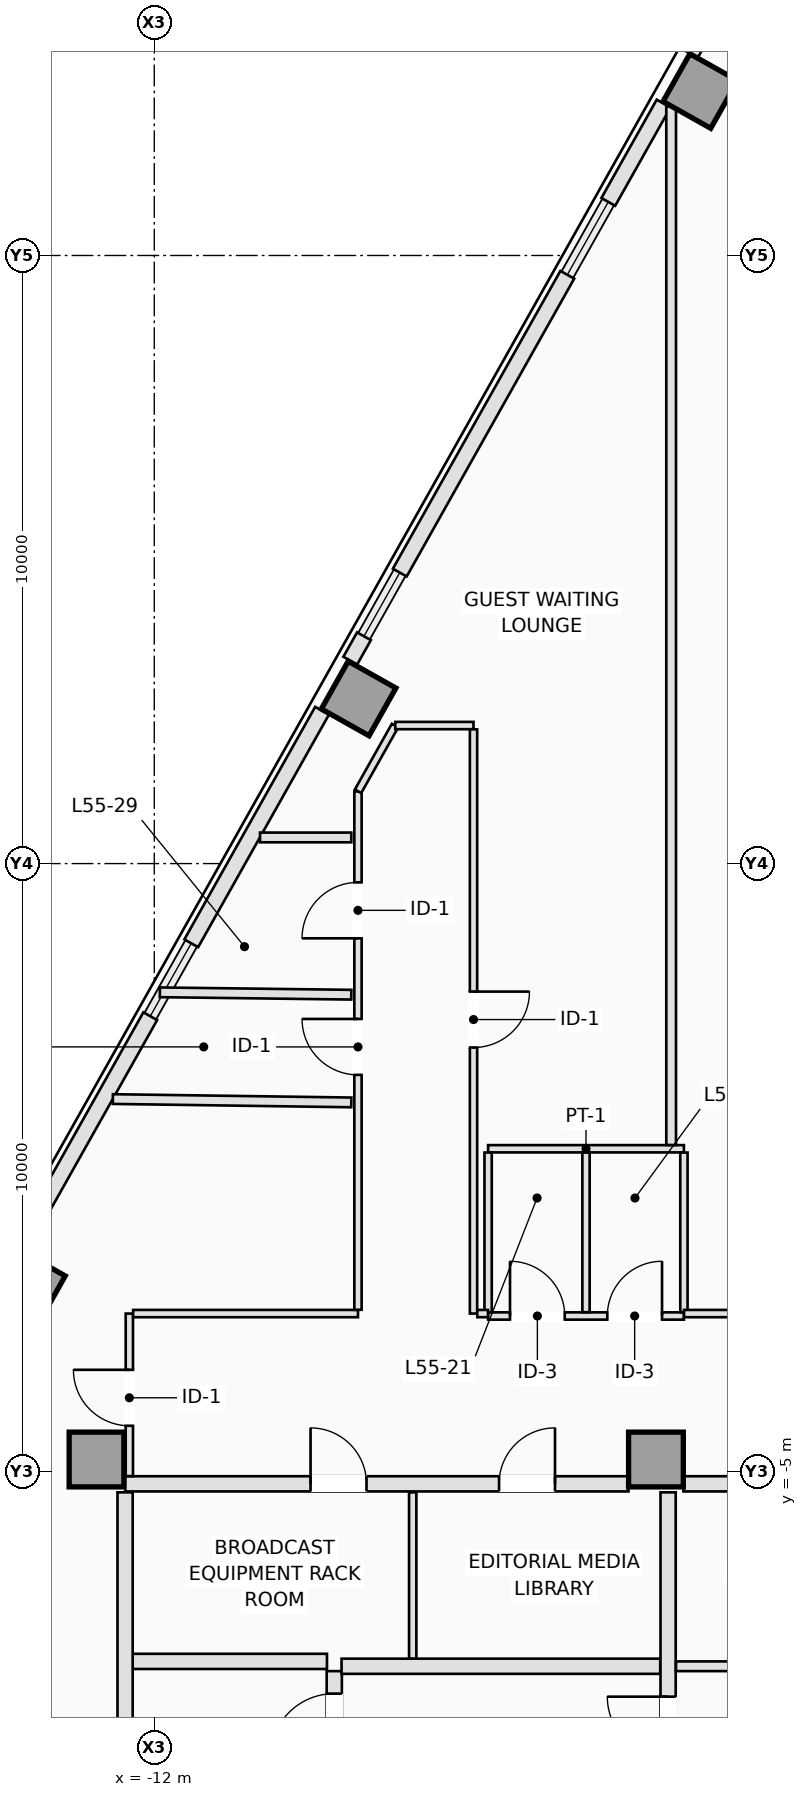
"""IFC4 building model, lengths in metres.
Left out: names, types, materials, properties, quantities, classifications, styles, units other than length and angle.
Written with IfcOpenShell. Run it as: python <this file> out.ifc"""

import sys

from ifc_helpers import new_model, si_unit, direction, frame, frame_2d, origin, origin_2d, place, context, subcontext, project, spatial, rectangle, extrude, element, fill, save


model = new_model("IFC4")
c1 = context("Model", 3, precision=1e-05, world=origin(), true_north=direction((0.0, 1.0)))
c2 = subcontext(c1, "Body", "Model", "MODEL_VIEW")
j1 = project(units=[si_unit("LENGTHUNIT", "METRE"), si_unit("PLANEANGLEUNIT", "RADIAN")], contexts=[c1])
p1 = place(None, origin())
s1 = spatial("IfcSite", under=j1, at=p1, CompositionType="ELEMENT")
p2 = place(p1, origin())
s2 = spatial("IfcBuilding", under=s1, at=p2, CompositionType="ELEMENT")
p3 = place(p2, frame((0.0, 0.0, 200.9)))
s3 = spatial("IfcBuildingStorey", under=s2, at=p3, CompositionType="ELEMENT", Elevation=200.9)
for number, where, z_axis, x_axis in (
    (1, (-12.95, -4.8, 0.0), (0.0, 0.0, 1.0), (1.0, 0.0, 0.0)),
    (2, (-3.75, -4.8, 0.0), (0.0, 0.0, 1.0), (1.0, 0.0, 0.0)),
    (3, (-3.021, 17.704, 0.0), (0.0, 0.0, 1.0), (-0.872, 0.49, 0.0)),
    (4, (-8.64, 7.715, 0.0), (0.0, 0.0, 1.0), (-0.872, 0.49, 0.0)),
    (5, (-14.077, -1.952, 0.0), (0.0, 0.0, 1.0), (-0.872, 0.49, 0.0)),
):
    element("IfcColumn", number, at=place(p3, frame(where, z_axis=z_axis, x_axis=x_axis)), inside=s3, PredefinedType="COLUMN", context=c2, shape_type="SweptSolid", body=[
        extrude(rectangle(XDim=0.9, YDim=0.9, at=origin_2d()), origin(), (0.0, 0.0, 1.0), 3.5),
    ])
p4 = place(p3, frame((-3.168, 18.309, 0.0), z_axis=(0.0, 0.0, 1.0), x_axis=(0.490345412687, 0.87152818443, 0.0)))
e6 = element("IfcWall", 6, at=p4, inside=s3, PredefinedType="STANDARD", context=c2, shape_type="SweptSolid", body=[
    extrude(rectangle(XDim=0.964, YDim=0.24, at=frame_2d((0.482, 0.0))), origin(), (0.0, 0.0, 1.0), 3.25),
])
p5 = place(p3, frame((-8.777, 8.337, 0.0), z_axis=(0.0, 0.0, 1.0), x_axis=(0.490412424957, 0.871490478116, 0.0)))
e7 = element("IfcWall", 7, at=p5, inside=s3, PredefinedType="STANDARD", context=c2, shape_type="SweptSolid", body=[
    extrude(rectangle(XDim=0.46, YDim=0.26, at=frame_2d((0.23, 0.0))), origin(), (0.0, 0.0, 1.0), 3.25),
])
p6 = place(p3, frame((-7.962, 9.785, 0.0), z_axis=(0.0, 0.0, 1.0), x_axis=(0.490240608828, 0.871587141631, 0.0)))
e8 = element("IfcWall", 8, at=p6, inside=s3, PredefinedType="STANDARD", context=c2, shape_type="SweptSolid", body=[
    extrude(rectangle(XDim=5.618, YDim=0.26, at=frame_2d((2.809, 0.0))), origin(), (0.0, 0.0, 1.0), 3.25),
])
p7 = place(p3, frame((-4.533, 15.882, 0.0), z_axis=(0.0, 0.0, 1.0), x_axis=(0.490261239633, 0.871575537125, 0.0)))
e9 = element("IfcWall", 9, at=p7, inside=s3, PredefinedType="STANDARD", context=c2, shape_type="SweptSolid", body=[
    extrude(rectangle(XDim=1.855, YDim=0.26, at=frame_2d((0.928, 0.0))), origin(), (0.0, 0.0, 1.0), 3.25),
])
p8 = place(p3, frame((-14.217, -1.334, 0.0), z_axis=(0.0, 0.0, 1.0), x_axis=(0.490261239633, 0.871575537125, 0.0)))
e10 = element("IfcWall", 10, at=p8, inside=s3, PredefinedType="STANDARD", context=c2, shape_type="SweptSolid", body=[
    extrude(rectangle(XDim=4.388, YDim=0.26, at=frame_2d((2.194, 0.0))), origin(), (0.0, 0.0, 1.0), 3.25),
])
p9 = place(p3, frame((-11.392, 3.689, 0.0), z_axis=(0.0, 0.0, 1.0), x_axis=(0.490237464814, 0.871588910033, 0.0)))
e11 = element("IfcWall", 11, at=p9, inside=s3, PredefinedType="STANDARD", context=c2, shape_type="SweptSolid", body=[
    extrude(rectangle(XDim=4.388, YDim=0.26, at=frame_2d((2.194, 0.0))), origin(), (0.0, 0.0, 1.0), 3.25),
])
p10 = place(p3, frame((-9.04, -10.18, 0.0), z_axis=(0.0, 0.0, 1.0), x_axis=(0.0, 1.0, 0.0)))
e12 = element("IfcWall", 12, at=p10, inside=s3, PredefinedType="PARTITIONING", context=c2, shape_type="SweptSolid", body=[
    extrude(rectangle(XDim=1.9, YDim=0.25, at=frame_2d((0.95, 0.0))), origin(), (0.0, 0.0, 1.0), 3.25),
])
p11 = place(p10, frame((0.48, 0.0, 0.0)))
e13 = element("IfcOpeningElement", 13, at=p11, cuts=e12, PredefinedType="OPENING", context=c2, shape_type="SweptSolid", body=[
    extrude(rectangle(XDim=1.05, YDim=2.15, at=frame_2d((0.525, 1.075))), frame((0.0, 0.135, 0.0), z_axis=(0.0, -1.0, 0.0), x_axis=(1.0, 0.0, 0.0)), (0.0, 0.0, 1.0), 0.27),
])
p12 = place(p3, frame((-12.38, -8.12, 0.0), z_axis=(0.0, 0.0, 1.0), x_axis=(1.0, 0.0, 0.0)))
e14 = element("IfcWall", 14, at=p12, inside=s3, PredefinedType="PARTITIONING", context=c2, shape_type="SweptSolid", body=[
    extrude(rectangle(XDim=3.22, YDim=0.25, at=frame_2d((1.61, 0.0))), origin(), (0.0, 0.0, 1.0), 3.25),
])
p13 = place(p3, frame((-12.48, -10.18, 0.0), z_axis=(0.0, 0.0, 1.0), x_axis=(0.0, 1.0, 0.0)))
e15 = element("IfcWall", 15, at=p13, inside=s3, PredefinedType="PARTITIONING", context=c2, shape_type="SweptSolid", body=[
    extrude(rectangle(XDim=4.84, YDim=0.25, at=frame_2d((2.42, 0.0))), origin(), (0.0, 0.0, 1.0), 3.25),
])
p14 = place(p3, frame((-8.92, -8.2, 0.0), z_axis=(0.0, 0.0, 1.0), x_axis=(1.0, 0.0, 0.0)))
e16 = element("IfcWall", 16, at=p14, inside=s3, PredefinedType="PARTITIONING", context=c2, shape_type="SweptSolid", body=[
    extrude(rectangle(XDim=5.24, YDim=0.25, at=frame_2d((2.62, 0.0))), origin(), (0.0, 0.0, 1.0), 3.25),
])
p15 = place(p3, frame((-3.55, -15.898, 0.0), z_axis=(0.0, 0.0, 1.0), x_axis=(0.0, 1.0, 0.0)))
e17 = element("IfcWall", 17, at=p15, inside=s3, PredefinedType="PARTITIONING", context=c2, shape_type="SweptSolid", body=[
    extrude(rectangle(XDim=10.558, YDim=0.25, at=frame_2d((5.279, 0.0))), origin(), (0.0, 0.0, 1.0), 3.25),
])
p16 = place(p15, frame((6.198, 0.0, 0.0)))
e18 = element("IfcOpeningElement", 18, at=p16, cuts=e17, PredefinedType="OPENING", context=c2, shape_type="SweptSolid", body=[
    extrude(rectangle(XDim=1.0, YDim=2.15, at=frame_2d((0.5, 1.075))), frame((0.0, 0.135, 0.0), z_axis=(0.0, -1.0, 0.0), x_axis=(1.0, 0.0, 0.0)), (0.0, 0.0, 1.0), 0.27),
])
p17 = place(p3, frame((-12.48, -5.2, 0.0), z_axis=(0.0, 0.0, 1.0), x_axis=(1.0, 0.0, 0.0)))
e19 = element("IfcWall", 19, at=p17, inside=s3, PredefinedType="PARTITIONING", context=c2, shape_type="SweptSolid", body=[
    extrude(rectangle(XDim=8.278, YDim=0.25, at=frame_2d((4.139, 0.0))), origin(), (0.0, 0.0, 1.0), 3.25),
])
p18 = place(p17, frame((3.05, 0.0, 0.0)))
e20 = element("IfcOpeningElement", 20, at=p18, cuts=e19, PredefinedType="OPENING", context=c2, shape_type="SweptSolid", body=[
    extrude(rectangle(XDim=0.92, YDim=2.12, at=frame_2d((0.46, 1.06))), frame((0.0, 0.135, 0.0), z_axis=(0.0, -1.0, 0.0), x_axis=(1.0, 0.0, 0.0)), (0.0, 0.0, 1.0), 0.27),
])
p19 = place(p17, frame((6.15, 0.0, 0.0)))
e21 = element("IfcOpeningElement", 21, at=p19, cuts=e19, PredefinedType="OPENING", context=c2, shape_type="SweptSolid", body=[
    extrude(rectangle(XDim=0.92, YDim=2.12, at=frame_2d((0.46, 1.06))), frame((0.0, 0.135, 0.0), z_axis=(0.0, -1.0, 0.0), x_axis=(1.0, 0.0, 0.0)), (0.0, 0.0, 1.0), 0.27),
])
p20 = place(p3, frame((-3.298, -5.2, 0.0), z_axis=(0.0, 0.0, 1.0), x_axis=(1.0, 0.0, 0.0)))
e22 = element("IfcWall", 22, at=p20, inside=s3, PredefinedType="PARTITIONING", context=c2, shape_type="SweptSolid", body=[
    extrude(rectangle(XDim=2.348, YDim=0.25, at=frame_2d((1.174, 0.0))), origin(), (0.0, 0.0, 1.0), 3.25),
])
p21 = place(p3, frame((-7.75, -8.073, 0.0), z_axis=(0.0, 0.0, 1.0), x_axis=(0.0, 1.0, 0.0)))
e23 = element("IfcWall", 23, at=p21, inside=s3, PredefinedType="PARTITIONING", context=c2, shape_type="SweptSolid", body=[
    extrude(rectangle(XDim=2.733, YDim=0.12, at=frame_2d((1.366, 0.0))), origin(), (0.0, 0.0, 1.0), 3.25),
])
p22 = place(p3, frame((-3.42, -8.2, 0.0), z_axis=(0.0, 0.0, 1.0), x_axis=(1.0, 0.0, 0.0)))
e24 = element("IfcWall", 24, at=p22, inside=s3, PredefinedType="PARTITIONING", context=c2, shape_type="SweptSolid", body=[
    extrude(rectangle(XDim=6.84, YDim=0.16, at=frame_2d((3.42, 0.0))), origin(), (0.0, 0.0, 1.0), 3.25),
])
p23 = place(p22, frame((2.92, 0.0, 0.0)))
e25 = element("IfcOpeningElement", 25, at=p23, cuts=e24, PredefinedType="OPENING", context=c2, shape_type="SweptSolid", body=[
    extrude(rectangle(XDim=1.0, YDim=2.15, at=frame_2d((0.5, 1.075))), frame((0.0, 0.09, 0.0), z_axis=(0.0, -1.0, 0.0), x_axis=(1.0, 0.0, 0.0)), (0.0, 0.0, 1.0), 0.18),
])
p24 = place(p3, frame((-6.51, -2.44, 0.0), z_axis=(0.0, 0.0, 1.0), x_axis=(1.0, 0.0, 0.0)))
e26 = element("IfcWall", 26, at=p24, inside=s3, PredefinedType="PARTITIONING", context=c2, shape_type="SweptSolid", body=[
    extrude(rectangle(XDim=3.22, YDim=0.12, at=frame_2d((1.61, 0.0))), origin(), (0.0, 0.0, 1.0), 2.943),
])
p25 = place(p24, frame((0.36, 0.0, 0.0)))
e27 = element("IfcOpeningElement", 27, at=p25, cuts=e26, PredefinedType="OPENING", context=c2, shape_type="SweptSolid", body=[
    extrude(rectangle(XDim=0.9, YDim=2.12, at=frame_2d((0.45, 1.06))), frame((0.0, 0.07, 0.0), z_axis=(0.0, -1.0, 0.0), x_axis=(1.0, 0.0, 0.0)), (0.0, 0.0, 1.0), 0.14),
])
p26 = place(p24, frame((1.96, 0.0, 0.0)))
e28 = element("IfcOpeningElement", 28, at=p26, cuts=e26, PredefinedType="OPENING", context=c2, shape_type="SweptSolid", body=[
    extrude(rectangle(XDim=0.9, YDim=2.12, at=frame_2d((0.45, 1.06))), frame((0.0, 0.07, 0.0), z_axis=(0.0, -1.0, 0.0), x_axis=(1.0, 0.0, 0.0)), (0.0, 0.0, 1.0), 0.14),
])
p27 = place(p3, frame((-6.51, 0.31, 0.0), z_axis=(0.0, 0.0, 1.0), x_axis=(1.0, 0.0, 0.0)))
e29 = element("IfcWall", 29, at=p27, inside=s3, PredefinedType="PARTITIONING", context=c2, shape_type="SweptSolid", body=[
    extrude(rectangle(XDim=3.22, YDim=0.12, at=frame_2d((1.61, 0.0))), origin(), (0.0, 0.0, 1.0), 3.25),
])
for number, where, z_axis, x_axis in (
    (30, (-6.51, -2.378, 0.0), (0.0, 0.0, 1.0), (0.0, 1.0, 0.0)),
    (31, (-4.9, -2.378, 0.0), (0.0, 0.0, 1.0), (0.0, 1.0, 0.0)),
    (32, (-3.29, -2.378, 0.0), (0.0, 0.0, 1.0), (0.0, 1.0, 0.0)),
):
    element("IfcWall", number, at=place(p3, frame(where, z_axis=z_axis, x_axis=x_axis)), inside=s3, PredefinedType="PARTITIONING", context=c2, shape_type="SweptSolid", body=[
        extrude(rectangle(XDim=2.626, YDim=0.12, at=frame_2d((1.313, 0.0))), origin(), (0.0, 0.0, 1.0), 3.25),
    ])
p28 = place(p3, frame((-12.41, -5.073, 0.0), z_axis=(0.0, 0.0, 1.0), x_axis=(0.0, 1.0, 0.0)))
e33 = element("IfcWall", 33, at=p28, inside=s3, PredefinedType="PARTITIONING", context=c2, shape_type="SweptSolid", body=[
    extrude(rectangle(XDim=2.673, YDim=0.12, at=frame_2d((1.336, 0.0))), origin(), (0.0, 0.0, 1.0), 3.25),
])
p29 = place(p28, frame((0.828, 0.0, 0.0)))
e34 = element("IfcOpeningElement", 34, at=p29, cuts=e33, PredefinedType="OPENING", context=c2, shape_type="SweptSolid", body=[
    extrude(rectangle(XDim=0.92, YDim=2.12, at=frame_2d((0.46, 1.06))), frame((0.0, 0.07, 0.0), z_axis=(0.0, -1.0, 0.0), x_axis=(1.0, 0.0, 0.0)), (0.0, 0.0, 1.0), 0.14),
])
p30 = place(p3, frame((-12.348, -2.4, 0.0), z_axis=(0.0, 0.0, 1.0), x_axis=(1.0, 0.0, 0.0)))
e35 = element("IfcWall", 35, at=p30, inside=s3, PredefinedType="PARTITIONING", context=c2, shape_type="SweptSolid", body=[
    extrude(rectangle(XDim=3.698, YDim=0.12, at=frame_2d((1.849, 0.0))), origin(), (0.0, 0.0, 1.0), 3.25),
])
p31 = place(p3, frame((-8.65, -2.338, 0.0), z_axis=(0.0, 0.0, 1.0), x_axis=(0.0, 1.0, 0.0)))
e36 = element("IfcWall", 36, at=p31, inside=s3, PredefinedType="PARTITIONING", context=c2, shape_type="SweptSolid", body=[
    extrude(rectangle(XDim=8.525, YDim=0.12, at=frame_2d((4.262, 0.0))), origin(), (0.0, 0.0, 1.0), 3.25),
])
p32 = place(p31, frame((6.109, 0.0, 0.0)))
e37 = element("IfcOpeningElement", 37, at=p32, cuts=e36, PredefinedType="OPENING", context=c2, shape_type="SweptSolid", body=[
    extrude(rectangle(XDim=0.92, YDim=2.12, at=frame_2d((0.46, 1.06))), frame((0.0, 0.07, 0.0), z_axis=(0.0, -1.0, 0.0), x_axis=(1.0, 0.0, 0.0)), (0.0, 0.0, 1.0), 0.14),
])
p33 = place(p31, frame((3.863, 0.0, 0.0)))
e38 = element("IfcOpeningElement", 38, at=p33, cuts=e36, PredefinedType="OPENING", context=c2, shape_type="SweptSolid", body=[
    extrude(rectangle(XDim=0.92, YDim=2.12, at=frame_2d((0.46, 1.06))), frame((0.0, 0.07, 0.0), z_axis=(0.0, -1.0, 0.0), x_axis=(1.0, 0.0, 0.0)), (0.0, 0.0, 1.0), 0.14),
])
p34 = place(p3, frame((-8.649, 6.189, 0.0), z_axis=(0.0, 0.0, 1.0), x_axis=(0.490298618985, 0.871554510183, 0.0)))
e39 = element("IfcWall", 39, at=p34, inside=s3, PredefinedType="PARTITIONING", context=c2, shape_type="SweptSolid", body=[
    extrude(rectangle(XDim=1.24, YDim=0.12, at=frame_2d((0.62, 0.0))), origin(), (0.0, 0.0, 1.0), 3.25),
])
p35 = place(p3, frame((-8.037, 7.27, 0.0), z_axis=(0.0, 0.0, 1.0), x_axis=(1.0, 0.0, 0.0)))
e40 = element("IfcWall", 40, at=p35, inside=s3, PredefinedType="PARTITIONING", context=c2, shape_type="SweptSolid", body=[
    extrude(rectangle(XDim=1.287, YDim=0.12, at=frame_2d((0.643, 0.0))), origin(), (0.0, 0.0, 1.0), 3.25),
])
p36 = place(p3, frame((-6.75, 7.208, 0.0), z_axis=(0.0, 0.0, 1.0), x_axis=(0.0, -1.0, 0.0)))
e41 = element("IfcWall", 41, at=p36, inside=s3, PredefinedType="PARTITIONING", context=c2, shape_type="SweptSolid", body=[
    extrude(rectangle(XDim=9.608, YDim=0.12, at=frame_2d((4.804, 0.0))), origin(), (0.0, 0.0, 1.0), 3.25),
])
p37 = place(p36, frame((4.313, 0.0, 0.0)))
e42 = element("IfcOpeningElement", 42, at=p37, cuts=e41, PredefinedType="OPENING", context=c2, shape_type="SweptSolid", body=[
    extrude(rectangle(XDim=0.92, YDim=2.12, at=frame_2d((0.46, 1.06))), frame((0.0, 0.07, 0.0), z_axis=(0.0, -1.0, 0.0), x_axis=(1.0, 0.0, 0.0)), (0.0, 0.0, 1.0), 0.14),
])
p38 = place(p3, frame((-6.688, -2.4, 0.0), z_axis=(0.0, 0.0, 1.0), x_axis=(1.0, 0.0, 0.0)))
e43 = element("IfcWall", 43, at=p38, inside=s3, PredefinedType="PARTITIONING", context=c2, shape_type="SweptSolid", body=[
    extrude(rectangle(XDim=0.176, YDim=0.12, at=frame_2d((0.088, 0.0))), origin(), (0.0, 0.0, 1.0), 3.25),
])
p39 = place(p3, frame((-3.288, -2.4, 0.0), z_axis=(0.0, 0.0, 1.0), x_axis=(1.0, 0.0, 0.0)))
e44 = element("IfcWall", 44, at=p39, inside=s3, PredefinedType="PARTITIONING", context=c2, shape_type="SweptSolid", body=[
    extrude(rectangle(XDim=6.576, YDim=0.12, at=frame_2d((3.288, 0.0))), origin(), (0.0, 0.0, 1.0), 2.943),
])
p40 = place(p39, frame((2.773, 0.0, 0.0)))
e45 = element("IfcOpeningElement", 45, at=p40, cuts=e44, PredefinedType="OPENING", context=c2, shape_type="SweptSolid", body=[
    extrude(rectangle(XDim=0.92, YDim=2.12, at=frame_2d((0.46, 1.06))), frame((0.0, 0.07, 0.0), z_axis=(0.0, -1.0, 0.0), x_axis=(1.0, 0.0, 0.0)), (0.0, 0.0, 1.0), 0.14),
])
p41 = place(p3, frame((-3.5, 17.455, 0.0), z_axis=(0.0, 0.0, 1.0), x_axis=(0.0, -1.0, 0.0)))
e46 = element("IfcWall", 46, at=p41, inside=s3, PredefinedType="PARTITIONING", context=c2, shape_type="SweptSolid", body=[
    extrude(rectangle(XDim=17.083, YDim=0.16, at=frame_2d((8.542, 0.0))), origin(), (0.0, 0.0, 1.0), 2.722),
])
p42 = place(p3, frame((-8.76, 5.43, 0.0), z_axis=(0.0, 0.0, 1.0), x_axis=(-1.0, 0.0, 0.0)))
e47 = element("IfcWall", 47, at=p42, inside=s3, PredefinedType="PARTITIONING", context=c2, shape_type="SweptSolid", body=[
    extrude(rectangle(XDim=1.501, YDim=0.16, at=frame_2d((0.75, 0.0))), origin(), (0.0, 0.0, 1.0), 3.25),
])
p43 = place(p3, frame((-8.76, 2.844, 0.0), z_axis=(0.0, 0.0, 1.0), x_axis=(-0.999923030771, 0.012406955015, 0.0)))
e48 = element("IfcWall", 48, at=p43, inside=s3, PredefinedType="PARTITIONING", context=c2, shape_type="SweptSolid", body=[
    extrude(rectangle(XDim=3.148, YDim=0.16, at=frame_2d((1.574, 0.0))), origin(), (0.0, 0.0, 1.0), 3.25),
])
p44 = place(p3, frame((-8.76, 1.073, 0.0), z_axis=(0.0, 0.0, 1.0), x_axis=(-0.999901887135, 0.014007715871, 0.0)))
e49 = element("IfcWall", 49, at=p44, inside=s3, PredefinedType="PARTITIONING", context=c2, shape_type="SweptSolid", body=[
    extrude(rectangle(XDim=3.922, YDim=0.16, at=frame_2d((1.961, 0.0))), origin(), (0.0, 0.0, 1.0), 3.25),
])
p45 = place(p11, origin())
e50 = element("IfcDoor", 50, at=p45, inside=s3, OperationType="SINGLE_SWING_LEFT", PredefinedType="DOOR", context=c2, shape_type="SweptSolid", body=[
    extrude(rectangle(XDim=1.05, YDim=2.15, at=frame_2d((0.525, 1.075))), frame((0.0, 0.025, 0.0), z_axis=(0.0, -1.0, 0.0), x_axis=(1.0, 0.0, 0.0)), (0.0, 0.0, 1.0), 0.05),
])
fill(e13, e50)
p46 = place(p16, origin())
e51 = element("IfcDoor", 51, at=p46, inside=s3, OperationType="SINGLE_SWING_RIGHT", PredefinedType="DOOR", context=c2, shape_type="SweptSolid", body=[
    extrude(rectangle(XDim=1.0, YDim=2.15, at=frame_2d((0.5, 1.075))), frame((0.0, 0.025, 0.0), z_axis=(0.0, -1.0, 0.0), x_axis=(1.0, 0.0, 0.0)), (0.0, 0.0, 1.0), 0.05),
])
fill(e18, e51)
p47 = place(p18, origin())
e52 = element("IfcDoor", 52, at=p47, inside=s3, OperationType="SINGLE_SWING_LEFT", PredefinedType="DOOR", context=c2, shape_type="SweptSolid", body=[
    extrude(rectangle(XDim=0.92, YDim=2.12, at=frame_2d((0.46, 1.06))), frame((0.0, 0.025, 0.0), z_axis=(0.0, -1.0, 0.0), x_axis=(1.0, 0.0, 0.0)), (0.0, 0.0, 1.0), 0.05),
])
fill(e20, e52)
p48 = place(p19, origin())
e53 = element("IfcDoor", 53, at=p48, inside=s3, OperationType="SINGLE_SWING_RIGHT", PredefinedType="DOOR", context=c2, shape_type="SweptSolid", body=[
    extrude(rectangle(XDim=0.92, YDim=2.12, at=frame_2d((0.46, 1.06))), frame((0.0, 0.025, 0.0), z_axis=(0.0, -1.0, 0.0), x_axis=(1.0, 0.0, 0.0)), (0.0, 0.0, 1.0), 0.05),
])
fill(e21, e53)
p49 = place(p25, origin())
e54 = element("IfcDoor", 54, at=p49, inside=s3, OperationType="SINGLE_SWING_LEFT", PredefinedType="DOOR", context=c2, shape_type="SweptSolid", body=[
    extrude(rectangle(XDim=0.9, YDim=2.12, at=frame_2d((0.45, 1.06))), frame((0.0, 0.025, 0.0), z_axis=(0.0, -1.0, 0.0), x_axis=(1.0, 0.0, 0.0)), (0.0, 0.0, 1.0), 0.05),
])
fill(e27, e54)
p50 = place(p26, origin())
e55 = element("IfcDoor", 55, at=p50, inside=s3, OperationType="SINGLE_SWING_RIGHT", PredefinedType="DOOR", context=c2, shape_type="SweptSolid", body=[
    extrude(rectangle(XDim=0.9, YDim=2.12, at=frame_2d((0.45, 1.06))), frame((0.0, 0.025, 0.0), z_axis=(0.0, -1.0, 0.0), x_axis=(1.0, 0.0, 0.0)), (0.0, 0.0, 1.0), 0.05),
])
fill(e28, e55)
p51 = place(p37, origin())
e56 = element("IfcDoor", 56, at=p51, inside=s3, OperationType="SINGLE_SWING_LEFT", PredefinedType="DOOR", context=c2, shape_type="SweptSolid", body=[
    extrude(rectangle(XDim=0.92, YDim=2.12, at=frame_2d((0.46, 1.06))), frame((0.0, 0.025, 0.0), z_axis=(0.0, -1.0, 0.0), x_axis=(1.0, 0.0, 0.0)), (0.0, 0.0, 1.0), 0.05),
])
fill(e42, e56)
p52 = place(p32, origin())
e57 = element("IfcDoor", 57, at=p52, inside=s3, OperationType="SINGLE_SWING_LEFT", PredefinedType="DOOR", context=c2, shape_type="SweptSolid", body=[
    extrude(rectangle(XDim=0.92, YDim=2.12, at=frame_2d((0.46, 1.06))), frame((0.0, 0.025, 0.0), z_axis=(0.0, -1.0, 0.0), x_axis=(1.0, 0.0, 0.0)), (0.0, 0.0, 1.0), 0.05),
])
fill(e37, e57)
p53 = place(p33, origin())
e58 = element("IfcDoor", 58, at=p53, inside=s3, OperationType="SINGLE_SWING_RIGHT", PredefinedType="DOOR", context=c2, shape_type="SweptSolid", body=[
    extrude(rectangle(XDim=0.92, YDim=2.12, at=frame_2d((0.46, 1.06))), frame((0.0, 0.025, 0.0), z_axis=(0.0, -1.0, 0.0), x_axis=(1.0, 0.0, 0.0)), (0.0, 0.0, 1.0), 0.05),
])
fill(e38, e58)
p54 = place(p29, origin())
e59 = element("IfcDoor", 59, at=p54, inside=s3, OperationType="SINGLE_SWING_RIGHT", PredefinedType="DOOR", context=c2, shape_type="SweptSolid", body=[
    extrude(rectangle(XDim=0.92, YDim=2.12, at=frame_2d((0.46, 1.06))), frame((0.0, 0.025, 0.0), z_axis=(0.0, -1.0, 0.0), x_axis=(1.0, 0.0, 0.0)), (0.0, 0.0, 1.0), 0.05),
])
fill(e34, e59)
save(model, sys.argv[1])
